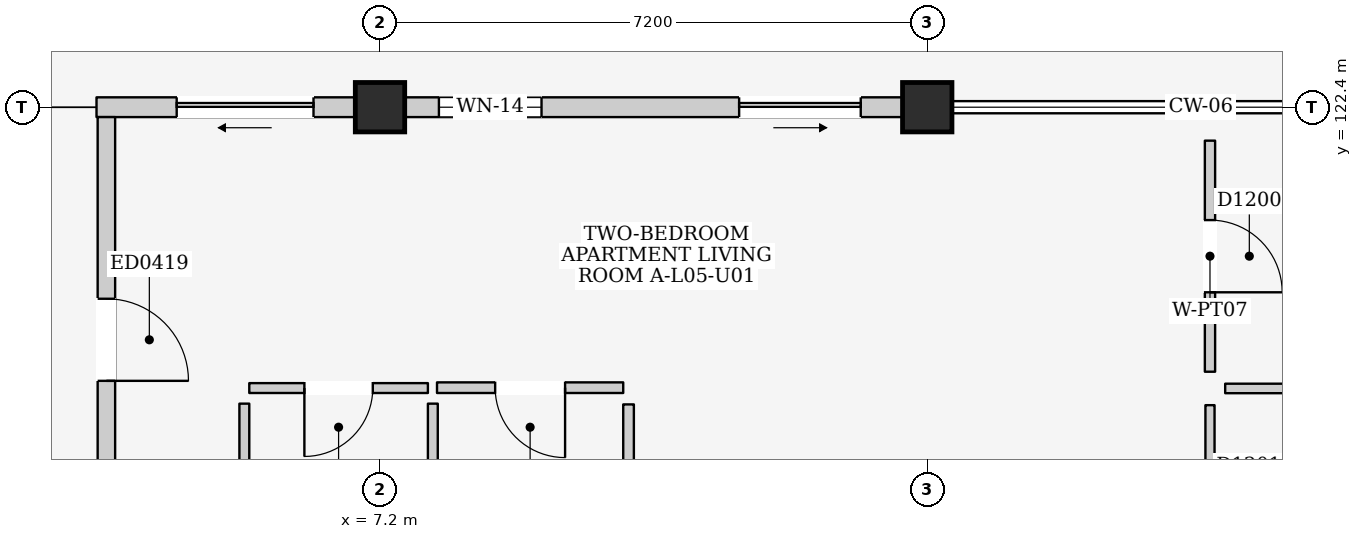
"""IFC4 building model, lengths in metres.
Left out: names, types, materials, properties, quantities, classifications, styles, units other than length and angle.
Written with IfcOpenShell. Run it as: python <this file> out.ifc"""

import sys

from ifc_helpers import new_model, si_unit, direction, frame, frame_2d, origin, origin_2d, place, context, subcontext, project, spatial, rectangle, extrude, element, fill, save


model = new_model("IFC4")
c1 = context("Model", 3, precision=1e-05, world=origin(), true_north=direction((0.0, 1.0)))
c2 = subcontext(c1, "Body", "Model", "MODEL_VIEW")
j1 = project(units=[si_unit("LENGTHUNIT", "METRE"), si_unit("PLANEANGLEUNIT", "RADIAN")], contexts=[c1])
p1 = place(None, origin())
s1 = spatial("IfcSite", under=j1, at=p1, CompositionType="ELEMENT")
p2 = place(p1, origin())
s2 = spatial("IfcBuilding", under=s1, at=p2, CompositionType="ELEMENT")
p3 = place(p2, frame((0.0, 0.0, 18.6)))
s3 = spatial("IfcBuildingStorey", under=s2, at=p3, CompositionType="ELEMENT", Elevation=18.6)
for number, where, z_axis, x_axis in (
    (1, (7.2, 122.4, 0.0), (0.0, 0.0, 1.0), (1.0, 0.0, 0.0)),
    (2, (14.4, 122.4, 0.0), (0.0, 0.0, 1.0), (1.0, 0.0, 0.0)),
):
    element("IfcColumn", number, at=place(p3, frame(where, z_axis=z_axis, x_axis=x_axis)), inside=s3, PredefinedType="COLUMN", context=c2, shape_type="SweptSolid", body=[
        extrude(rectangle(XDim=0.65, YDim=0.65, at=origin_2d()), origin(), (0.0, 0.0, 1.0), 3.3),
    ])
p4 = place(p3, frame((3.47, 122.4, 0.0), z_axis=(0.0, 0.0, 1.0), x_axis=(1.0, 0.0, 0.0)))
e3 = element("IfcWall", 3, at=p4, inside=s3, PredefinedType="ELEMENTEDWALL", context=c2, shape_type="SweptSolid", body=[
    extrude(rectangle(XDim=3.405, YDim=0.26, at=frame_2d((1.703, 0.0))), origin(), (0.0, 0.0, 1.0), 2.395),
])
p5 = place(p4, frame((1.055, 0.0, 0.0)))
e4 = element("IfcOpeningElement", 4, at=p5, cuts=e3, PredefinedType="OPENING", context=c2, shape_type="SweptSolid", body=[
    extrude(rectangle(XDim=1.8, YDim=2.12, at=frame_2d((0.9, 1.06))), frame((0.0, 0.145, 0.0), z_axis=(0.0, -1.0, 0.0), x_axis=(1.0, 0.0, 0.0)), (0.0, 0.0, 1.0), 0.29),
])
p6 = place(p3, frame((7.525, 122.4, 0.0), z_axis=(0.0, 0.0, 1.0), x_axis=(1.0, 0.0, 0.0)))
e5 = element("IfcWall", 5, at=p6, inside=s3, PredefinedType="ELEMENTEDWALL", context=c2, shape_type="SweptSolid", body=[
    extrude(rectangle(XDim=6.55, YDim=0.26, at=frame_2d((3.275, 0.0))), origin(), (0.0, 0.0, 1.0), 2.595),
])
p7 = place(p6, frame((4.4, 0.0, 0.0)))
e6 = element("IfcOpeningElement", 6, at=p7, cuts=e5, PredefinedType="OPENING", context=c2, shape_type="SweptSolid", body=[
    extrude(rectangle(XDim=1.6, YDim=2.12, at=frame_2d((0.8, 1.06))), frame((0.0, 0.145, 0.0), z_axis=(0.0, -1.0, 0.0), x_axis=(1.0, 0.0, 0.0)), (0.0, 0.0, 1.0), 0.29),
])
p8 = place(p6, frame((0.45, 0.0, 0.9)))
e7 = element("IfcOpeningElement", 7, at=p8, cuts=e5, PredefinedType="OPENING", context=c2, shape_type="SweptSolid", body=[
    extrude(rectangle(XDim=1.35, YDim=1.5, at=frame_2d((0.675, 0.75))), frame((0.0, 0.145, 0.0), z_axis=(0.0, -1.0, 0.0), x_axis=(1.0, 0.0, 0.0)), (0.0, 0.0, 1.0), 0.29),
])
p9 = place(p3, frame((3.6, 115.2, 0.0), z_axis=(0.0, 0.0, 1.0), x_axis=(0.0, 1.0, 0.0)))
e8 = element("IfcWall", 8, at=p9, inside=s3, PredefinedType="ELEMENTEDWALL", context=c2, shape_type="SweptSolid", body=[
    extrude(rectangle(XDim=7.07, YDim=0.23, at=frame_2d((3.535, 0.0))), origin(), (0.0, 0.0, 1.0), 2.495),
])
p10 = place(p9, frame((3.6, 0.0, 0.0)))
e9 = element("IfcOpeningElement", 9, at=p10, cuts=e8, PredefinedType="OPENING", context=c2, shape_type="SweptSolid", body=[
    extrude(rectangle(XDim=1.08, YDim=2.12, at=frame_2d((0.54, 1.06))), frame((0.0, 0.13, 0.0), z_axis=(0.0, -1.0, 0.0), x_axis=(1.0, 0.0, 0.0)), (0.0, 0.0, 1.0), 0.26),
])
p11 = place(p3, frame((5.48, 118.705, 0.0), z_axis=(0.0, 0.0, 1.0), x_axis=(1.0, 0.0, 0.0)))
e10 = element("IfcWall", 10, at=p11, inside=s3, PredefinedType="PARTITIONING", context=c2, shape_type="SweptSolid", body=[
    extrude(rectangle(XDim=2.35, YDim=0.13, at=frame_2d((1.175, 0.0))), origin(), (0.0, 0.0, 1.0), 3.06),
])
p12 = place(p11, frame((0.725, 0.0, 0.0)))
e11 = element("IfcOpeningElement", 11, at=p12, cuts=e10, PredefinedType="OPENING", context=c2, shape_type="SweptSolid", body=[
    extrude(rectangle(XDim=0.9, YDim=2.1, at=frame_2d((0.45, 1.05))), frame((0.0, 0.08, 0.0), z_axis=(0.0, -1.0, 0.0), x_axis=(1.0, 0.0, 0.0)), (0.0, 0.0, 1.0), 0.16),
])
for number, where, z_axis, x_axis in (
    (12, (7.895, 115.46, 0.0), (0.0, 0.0, 1.0), (0.0, 1.0, 0.0)),
    (13, (5.415, 115.46, 0.0), (0.0, 0.0, 1.0), (0.0, 1.0, 0.0)),
):
    element("IfcWall", number, at=place(p3, frame(where, z_axis=z_axis, x_axis=x_axis)), inside=s3, PredefinedType="PARTITIONING", context=c2, shape_type="SweptSolid", body=[
        extrude(rectangle(XDim=3.04, YDim=0.13, at=frame_2d((1.52, 0.0))), origin(), (0.0, 0.0, 1.0), 3.06),
    ])
p13 = place(p3, frame((7.95, 118.71, 0.0), z_axis=(0.0, 0.0, 1.0), x_axis=(1.0, 0.0, 0.0)))
e14 = element("IfcWall", 14, at=p13, inside=s3, PredefinedType="PARTITIONING", context=c2, shape_type="SweptSolid", body=[
    extrude(rectangle(XDim=2.45, YDim=0.14, at=frame_2d((1.225, 0.0))), origin(), (0.0, 0.0, 1.0), 3.06),
])
p14 = place(p13, frame((0.765, 0.0, 0.0)))
e15 = element("IfcOpeningElement", 15, at=p14, cuts=e14, PredefinedType="OPENING", context=c2, shape_type="SweptSolid", body=[
    extrude(rectangle(XDim=0.92, YDim=2.1, at=frame_2d((0.46, 1.05))), frame((0.0, 0.085, 0.0), z_axis=(0.0, -1.0, 0.0), x_axis=(1.0, 0.0, 0.0)), (0.0, 0.0, 1.0), 0.17),
])
p15 = place(p3, frame((10.47, 115.43, 0.0), z_axis=(0.0, 0.0, 1.0), x_axis=(0.0, 1.0, 0.0)))
e16 = element("IfcWall", 16, at=p15, inside=s3, PredefinedType="PARTITIONING", context=c2, shape_type="SweptSolid", body=[
    extrude(rectangle(XDim=3.06, YDim=0.14, at=frame_2d((1.53, 0.0))), origin(), (0.0, 0.0, 1.0), 3.06),
])
p16 = place(p3, frame((18.12, 118.92, 0.0), z_axis=(0.0, 0.0, 1.0), x_axis=(0.0, 1.0, 0.0)))
e17 = element("IfcWall", 17, at=p16, inside=s3, PredefinedType="PARTITIONING", context=c2, shape_type="SweptSolid", body=[
    extrude(rectangle(XDim=3.04, YDim=0.135, at=frame_2d((1.52, 0.0))), origin(), (0.0, 0.0, 1.0), 3.06),
])
p17 = place(p16, frame((1.045, 0.0, 0.0)))
e18 = element("IfcOpeningElement", 18, at=p17, cuts=e17, PredefinedType="OPENING", context=c2, shape_type="SweptSolid", body=[
    extrude(rectangle(XDim=0.95, YDim=2.15, at=frame_2d((0.475, 1.075))), frame((0.0, 0.083, 0.0), z_axis=(0.0, -1.0, 0.0), x_axis=(1.0, 0.0, 0.0)), (0.0, 0.0, 1.0), 0.165),
])
p18 = place(p3, frame((18.32, 118.7, 0.0), z_axis=(0.0, 0.0, 1.0), x_axis=(1.0, 0.0, 0.0)))
e19 = element("IfcWall", 19, at=p18, inside=s3, PredefinedType="PARTITIONING", context=c2, shape_type="SweptSolid", body=[
    extrude(rectangle(XDim=3.06, YDim=0.125, at=frame_2d((1.53, 0.0))), origin(), (0.0, 0.0, 1.0), 3.06),
])
p19 = place(p3, frame((18.12, 115.44, 0.0), z_axis=(0.0, 0.0, 1.0), x_axis=(0.0, 1.0, 0.0)))
e20 = element("IfcWall", 20, at=p19, inside=s3, PredefinedType="PARTITIONING", context=c2, shape_type="SweptSolid", body=[
    extrude(rectangle(XDim=3.04, YDim=0.12, at=frame_2d((1.52, 0.0))), origin(), (0.0, 0.0, 1.0), 3.06),
])
p20 = place(p19, frame((1.04, 0.0, 0.0)))
e21 = element("IfcOpeningElement", 21, at=p20, cuts=e20, PredefinedType="OPENING", context=c2, shape_type="SweptSolid", body=[
    extrude(rectangle(XDim=0.96, YDim=2.15, at=frame_2d((0.48, 1.075))), frame((0.0, 0.075, 0.0), z_axis=(0.0, -1.0, 0.0), x_axis=(1.0, 0.0, 0.0)), (0.0, 0.0, 1.0), 0.15),
])
p21 = place(p5, frame((1.8, 0.0, 0.0), z_axis=(0.0, 0.0, 1.0), x_axis=(-1.0, 0.0, 0.0)))
e22 = element("IfcDoor", 22, at=p21, inside=s3, OperationType="SLIDING_TO_LEFT", PredefinedType="DOOR", context=c2, shape_type="SweptSolid", body=[
    extrude(rectangle(XDim=1.8, YDim=2.12, at=frame_2d((0.9, 1.06))), frame((0.0, 0.025, 0.0), z_axis=(0.0, -1.0, 0.0), x_axis=(1.0, 0.0, 0.0)), (0.0, 0.0, 1.0), 0.05),
])
fill(e4, e22)
p22 = place(p7, frame((1.6, 0.0, 0.0), z_axis=(0.0, 0.0, 1.0), x_axis=(-1.0, 0.0, 0.0)))
e23 = element("IfcDoor", 23, at=p22, inside=s3, OperationType="SLIDING_TO_RIGHT", PredefinedType="DOOR", context=c2, shape_type="SweptSolid", body=[
    extrude(rectangle(XDim=1.6, YDim=2.12, at=frame_2d((0.8, 1.06))), frame((0.0, 0.025, 0.0), z_axis=(0.0, -1.0, 0.0), x_axis=(1.0, 0.0, 0.0)), (0.0, 0.0, 1.0), 0.05),
])
fill(e6, e23)
p23 = place(p8, origin())
e24 = element("IfcWindow", 24, at=p23, inside=s3, PartitioningType="SINGLE_PANEL", PredefinedType="WINDOW", context=c2, shape_type="SweptSolid", body=[
    extrude(rectangle(XDim=1.35, YDim=1.5, at=frame_2d((0.675, 0.75))), frame((0.0, 0.03, 0.0), z_axis=(0.0, -1.0, 0.0), x_axis=(1.0, 0.0, 0.0)), (0.0, 0.0, 1.0), 0.06),
])
fill(e7, e24)
p24 = place(p10, frame((1.08, 0.0, 0.0), z_axis=(0.0, 0.0, 1.0), x_axis=(-1.0, 0.0, 0.0)))
e25 = element("IfcDoor", 25, at=p24, inside=s3, OperationType="SINGLE_SWING_RIGHT", PredefinedType="DOOR", context=c2, shape_type="SweptSolid", body=[
    extrude(rectangle(XDim=1.08, YDim=2.12, at=frame_2d((0.54, 1.06))), frame((0.0, 0.025, 0.0), z_axis=(0.0, -1.0, 0.0), x_axis=(1.0, 0.0, 0.0)), (0.0, 0.0, 1.0), 0.05),
])
fill(e9, e25)
p25 = place(p12, frame((0.9, 0.0, 0.0), z_axis=(0.0, 0.0, 1.0), x_axis=(-1.0, 0.0, 0.0)))
e26 = element("IfcDoor", 26, at=p25, inside=s3, OperationType="SINGLE_SWING_RIGHT", PredefinedType="DOOR", context=c2, shape_type="SweptSolid", body=[
    extrude(rectangle(XDim=0.9, YDim=2.1, at=frame_2d((0.45, 1.05))), frame((0.0, 0.025, 0.0), z_axis=(0.0, -1.0, 0.0), x_axis=(1.0, 0.0, 0.0)), (0.0, 0.0, 1.0), 0.05),
])
fill(e11, e26)
p26 = place(p14, frame((0.92, 0.0, 0.0), z_axis=(0.0, 0.0, 1.0), x_axis=(-1.0, 0.0, 0.0)))
e27 = element("IfcDoor", 27, at=p26, inside=s3, OperationType="SINGLE_SWING_LEFT", PredefinedType="DOOR", context=c2, shape_type="SweptSolid", body=[
    extrude(rectangle(XDim=0.92, YDim=2.1, at=frame_2d((0.46, 1.05))), frame((0.0, 0.025, 0.0), z_axis=(0.0, -1.0, 0.0), x_axis=(1.0, 0.0, 0.0)), (0.0, 0.0, 1.0), 0.05),
])
fill(e15, e27)
p27 = place(p17, frame((0.95, 0.0, 0.0), z_axis=(0.0, 0.0, 1.0), x_axis=(-1.0, 0.0, 0.0)))
e28 = element("IfcDoor", 28, at=p27, inside=s3, OperationType="SINGLE_SWING_RIGHT", PredefinedType="DOOR", context=c2, shape_type="SweptSolid", body=[
    extrude(rectangle(XDim=0.95, YDim=2.15, at=frame_2d((0.475, 1.075))), frame((0.0, 0.025, 0.0), z_axis=(0.0, -1.0, 0.0), x_axis=(1.0, 0.0, 0.0)), (0.0, 0.0, 1.0), 0.05),
])
fill(e18, e28)
save(model, sys.argv[1])
